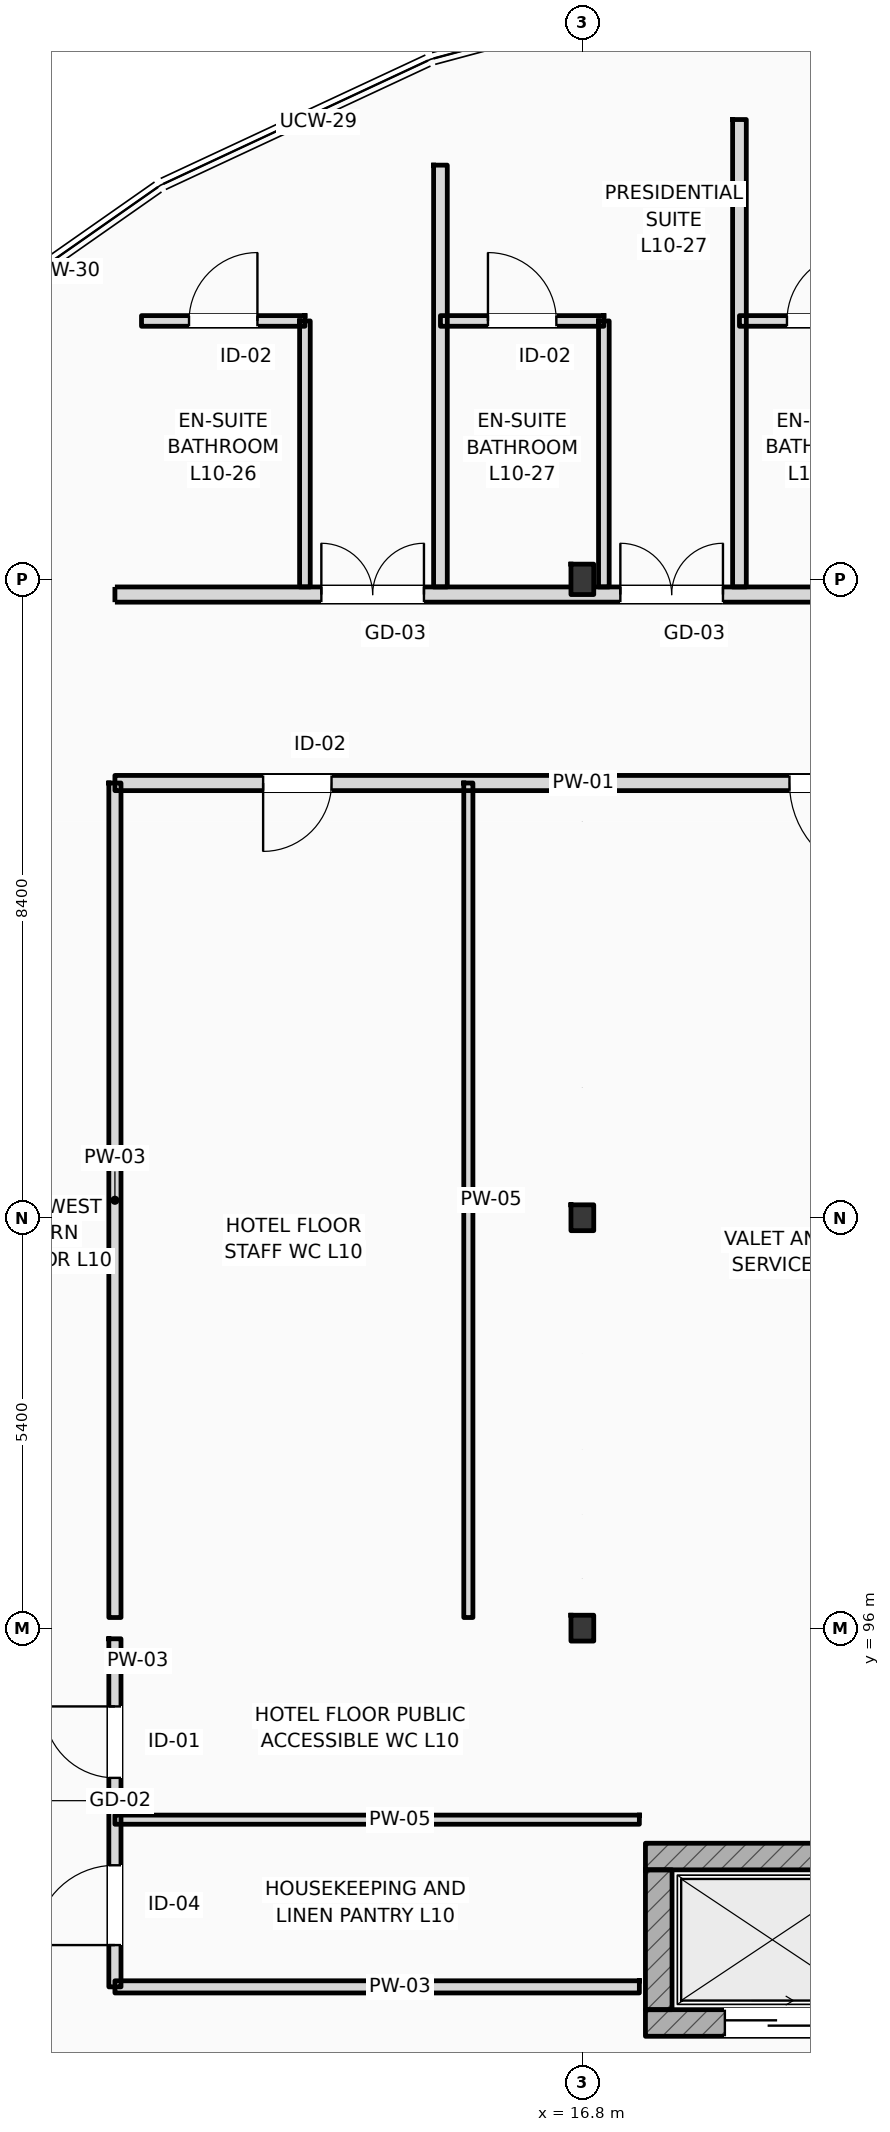
"""IFC4 building model, lengths in metres.
Left out: names, types, materials, properties, quantities, classifications, styles, units other than length and angle.
Written with IfcOpenShell. Run it as: python <this file> out.ifc"""

import sys

from ifc_helpers import new_model, si_unit, direction, frame, frame_2d, origin, origin_2d, place, context, subcontext, project, spatial, rectangle, i_section, extrude, element, fill, save


model = new_model("IFC4")
c1 = context("Model", 3, precision=1e-05, world=origin(), true_north=direction((0.0, 1.0)))
c2 = subcontext(c1, "Body", "Model", "MODEL_VIEW")
j1 = project(units=[si_unit("LENGTHUNIT", "METRE"), si_unit("PLANEANGLEUNIT", "RADIAN")], contexts=[c1])
p1 = place(None, origin())
s1 = spatial("IfcSite", under=j1, at=p1, CompositionType="ELEMENT")
p2 = place(p1, origin())
s2 = spatial("IfcBuilding", under=s1, at=p2, CompositionType="ELEMENT")
p3 = place(p2, frame((0.0, 0.0, 42.6)))
s3 = spatial("IfcBuildingStorey", under=s2, at=p3, CompositionType="ELEMENT", Elevation=42.6)
for number, where, z_axis, x_axis in (
    (1, (16.8, 96.0, 0.0), (0.0, 0.0, 1.0), (1.0, 0.0, 0.0)),
    (2, (16.8, 101.4, 0.0), (0.0, 0.0, 1.0), (1.0, 0.0, 0.0)),
):
    element("IfcColumn", number, at=place(p3, frame(where, z_axis=z_axis, x_axis=x_axis)), inside=s3, PredefinedType="COLUMN", context=c2, shape_type="SweptSolid", body=[
        extrude(i_section(OverallWidth=0.3, OverallDepth=0.34, WebThickness=0.012, FlangeThickness=0.021, FilletRadius=0.027, at=origin_2d()), origin(), (0.0, 0.0, 1.0), 4.2),
    ])
p4 = place(p3, frame((16.8, 109.8, 0.0), z_axis=(0.0, 0.0, 1.0), x_axis=(1.0, 0.0, 0.0)))
e3 = element("IfcColumn", 3, at=p4, inside=s3, PredefinedType="COLUMN", context=c2, shape_type="SweptSolid", body=[
    extrude(i_section(OverallWidth=0.3, OverallDepth=0.4, WebThickness=0.013, FlangeThickness=0.024, FilletRadius=0.027, at=origin_2d()), origin(), (0.0, 0.0, 1.0), 4.2),
])
p5 = place(p3, frame((17.63, 92.995, 0.0), z_axis=(0.0, 0.0, 1.0), x_axis=(1.0, 0.0, 0.0)))
e4 = element("IfcWall", 4, at=p5, inside=s3, PredefinedType="SHEAR", context=c2, shape_type="SweptSolid", body=[
    extrude(rectangle(XDim=3.34, YDim=0.35, at=frame_2d((1.67, 0.0))), origin(), (0.0, 0.0, 1.0), 3.94),
])
p6 = place(p3, frame((17.63, 90.805, 0.0), z_axis=(0.0, 0.0, 1.0), x_axis=(1.0, 0.0, 0.0)))
e5 = element("IfcWall", 5, at=p6, inside=s3, PredefinedType="SHEAR", context=c2, shape_type="SweptSolid", body=[
    extrude(rectangle(XDim=3.34, YDim=0.35, at=frame_2d((1.67, 0.0))), origin(), (0.0, 0.0, 1.0), 3.94),
])
p7 = place(p6, frame((1.045, 0.0, 0.0)))
e6 = element("IfcOpeningElement", 6, at=p7, cuts=e5, PredefinedType="OPENING", context=c2, shape_type="SweptSolid", body=[
    extrude(rectangle(XDim=1.25, YDim=2.25, at=frame_2d((0.625, 1.125))), frame((0.0, 0.185, 0.0), z_axis=(0.0, -1.0, 0.0), x_axis=(1.0, 0.0, 0.0)), (0.0, 0.0, 1.0), 0.37),
])
p8 = place(p3, frame((17.805, 90.98, 0.0), z_axis=(0.0, 0.0, 1.0), x_axis=(0.0, 1.0, 0.0)))
e7 = element("IfcWall", 7, at=p8, inside=s3, PredefinedType="SHEAR", context=c2, shape_type="SweptSolid", body=[
    extrude(rectangle(XDim=1.84, YDim=0.35, at=frame_2d((0.92, 0.0))), origin(), (0.0, 0.0, 1.0), 3.94),
])
p9 = place(p3, frame((10.65, 109.6, 0.0), z_axis=(0.0, 0.0, 1.0), x_axis=(1.0, 0.0, 0.0)))
e8 = element("IfcWall", 8, at=p9, inside=s3, PredefinedType="PARTITIONING", context=c2, shape_type="SweptSolid", body=[
    extrude(rectangle(XDim=84.61, YDim=0.2, at=frame_2d((42.305, 0.0))), origin(), (0.0, 0.0, 1.0), 3.38),
])
p10 = place(p9, frame((15.926, 0.0, 0.0)))
e9 = element("IfcOpeningElement", 9, at=p10, cuts=e8, PredefinedType="OPENING", context=c2, shape_type="SweptSolid", body=[
    extrude(rectangle(XDim=1.02, YDim=2.2, at=frame_2d((0.51, 1.1))), frame((0.0, 0.11, 0.0), z_axis=(0.0, -1.0, 0.0), x_axis=(1.0, 0.0, 0.0)), (0.0, 0.0, 1.0), 0.22),
])
p11 = place(p9, frame((18.45, 0.0, 0.0)))
e10 = element("IfcOpeningElement", 10, at=p11, cuts=e8, PredefinedType="OPENING", context=c2, shape_type="SweptSolid", body=[
    extrude(rectangle(XDim=1.02, YDim=2.2, at=frame_2d((0.51, 1.1))), frame((0.0, 0.11, 0.0), z_axis=(0.0, -1.0, 0.0), x_axis=(1.0, 0.0, 0.0)), (0.0, 0.0, 1.0), 0.22),
])
p12 = place(p9, frame((25.742, 0.0, 0.0)))
e11 = element("IfcOpeningElement", 11, at=p12, cuts=e8, PredefinedType="OPENING", context=c2, shape_type="SweptSolid", body=[
    extrude(rectangle(XDim=1.02, YDim=2.2, at=frame_2d((0.51, 1.1))), frame((0.0, 0.11, 0.0), z_axis=(0.0, -1.0, 0.0), x_axis=(1.0, 0.0, 0.0)), (0.0, 0.0, 1.0), 0.22),
])
p13 = place(p9, frame((31.385, 0.0, 0.0)))
e12 = element("IfcOpeningElement", 12, at=p13, cuts=e8, PredefinedType="OPENING", context=c2, shape_type="SweptSolid", body=[
    extrude(rectangle(XDim=1.02, YDim=2.2, at=frame_2d((0.51, 1.1))), frame((0.0, 0.11, 0.0), z_axis=(0.0, -1.0, 0.0), x_axis=(1.0, 0.0, 0.0)), (0.0, 0.0, 1.0), 0.22),
])
p14 = place(p9, frame((33.908, 0.0, 0.0)))
e13 = element("IfcOpeningElement", 13, at=p14, cuts=e8, PredefinedType="OPENING", context=c2, shape_type="SweptSolid", body=[
    extrude(rectangle(XDim=0.96, YDim=2.2, at=frame_2d((0.48, 1.1))), frame((0.0, 0.11, 0.0), z_axis=(0.0, -1.0, 0.0), x_axis=(1.0, 0.0, 0.0)), (0.0, 0.0, 1.0), 0.22),
])
p15 = place(p9, frame((41.201, 0.0, 0.0)))
e14 = element("IfcOpeningElement", 14, at=p15, cuts=e8, PredefinedType="OPENING", context=c2, shape_type="SweptSolid", body=[
    extrude(rectangle(XDim=0.96, YDim=2.2, at=frame_2d((0.48, 1.1))), frame((0.0, 0.11, 0.0), z_axis=(0.0, -1.0, 0.0), x_axis=(1.0, 0.0, 0.0)), (0.0, 0.0, 1.0), 0.22),
])
p16 = place(p9, frame((46.844, 0.0, 0.0)))
e15 = element("IfcOpeningElement", 15, at=p16, cuts=e8, PredefinedType="OPENING", context=c2, shape_type="SweptSolid", body=[
    extrude(rectangle(XDim=0.96, YDim=2.2, at=frame_2d((0.48, 1.1))), frame((0.0, 0.11, 0.0), z_axis=(0.0, -1.0, 0.0), x_axis=(1.0, 0.0, 0.0)), (0.0, 0.0, 1.0), 0.22),
])
p17 = place(p9, frame((49.337, 0.0, 0.0)))
e16 = element("IfcOpeningElement", 16, at=p17, cuts=e8, PredefinedType="OPENING", context=c2, shape_type="SweptSolid", body=[
    extrude(rectangle(XDim=0.96, YDim=2.2, at=frame_2d((0.48, 1.1))), frame((0.0, 0.11, 0.0), z_axis=(0.0, -1.0, 0.0), x_axis=(1.0, 0.0, 0.0)), (0.0, 0.0, 1.0), 0.22),
])
p18 = place(p9, frame((56.63, 0.0, 0.0)))
e17 = element("IfcOpeningElement", 17, at=p18, cuts=e8, PredefinedType="OPENING", context=c2, shape_type="SweptSolid", body=[
    extrude(rectangle(XDim=0.96, YDim=2.2, at=frame_2d((0.48, 1.1))), frame((0.0, 0.11, 0.0), z_axis=(0.0, -1.0, 0.0), x_axis=(1.0, 0.0, 0.0)), (0.0, 0.0, 1.0), 0.22),
])
p19 = place(p9, frame((62.523, 0.0, 0.0)))
e18 = element("IfcOpeningElement", 18, at=p19, cuts=e8, PredefinedType="OPENING", context=c2, shape_type="SweptSolid", body=[
    extrude(rectangle(XDim=0.96, YDim=2.2, at=frame_2d((0.48, 1.1))), frame((0.0, 0.11, 0.0), z_axis=(0.0, -1.0, 0.0), x_axis=(1.0, 0.0, 0.0)), (0.0, 0.0, 1.0), 0.22),
])
p20 = place(p9, frame((64.765, 0.0, 0.0)))
e19 = element("IfcOpeningElement", 19, at=p20, cuts=e8, PredefinedType="OPENING", context=c2, shape_type="SweptSolid", body=[
    extrude(rectangle(XDim=0.96, YDim=2.2, at=frame_2d((0.48, 1.1))), frame((0.0, 0.11, 0.0), z_axis=(0.0, -1.0, 0.0), x_axis=(1.0, 0.0, 0.0)), (0.0, 0.0, 1.0), 0.22),
])
p21 = place(p9, frame((72.057, 0.0, 0.0)))
e20 = element("IfcOpeningElement", 20, at=p21, cuts=e8, PredefinedType="OPENING", context=c2, shape_type="SweptSolid", body=[
    extrude(rectangle(XDim=0.96, YDim=2.2, at=frame_2d((0.48, 1.1))), frame((0.0, 0.11, 0.0), z_axis=(0.0, -1.0, 0.0), x_axis=(1.0, 0.0, 0.0)), (0.0, 0.0, 1.0), 0.22),
])
p22 = place(p9, frame((74.55, 0.0, 0.0)))
e21 = element("IfcOpeningElement", 21, at=p22, cuts=e8, PredefinedType="OPENING", context=c2, shape_type="SweptSolid", body=[
    extrude(rectangle(XDim=0.96, YDim=2.2, at=frame_2d((0.48, 1.1))), frame((0.0, 0.11, 0.0), z_axis=(0.0, -1.0, 0.0), x_axis=(1.0, 0.0, 0.0)), (0.0, 0.0, 1.0), 0.22),
])
p23 = place(p9, frame((80.163, 0.0, 0.0)))
e22 = element("IfcOpeningElement", 22, at=p23, cuts=e8, PredefinedType="OPENING", context=c2, shape_type="SweptSolid", body=[
    extrude(rectangle(XDim=0.96, YDim=2.2, at=frame_2d((0.48, 1.1))), frame((0.0, 0.11, 0.0), z_axis=(0.0, -1.0, 0.0), x_axis=(1.0, 0.0, 0.0)), (0.0, 0.0, 1.0), 0.22),
])
p24 = place(p9, frame((2.716, 0.0, 0.0)))
e23 = element("IfcOpeningElement", 23, at=p24, cuts=e8, PredefinedType="OPENING", context=c2, shape_type="SweptSolid", body=[
    extrude(rectangle(XDim=1.35, YDim=2.25, at=frame_2d((0.675, 1.125))), frame((0.0, 0.11, 0.0), z_axis=(0.0, -1.0, 0.0), x_axis=(1.0, 0.0, 0.0)), (0.0, 0.0, 1.0), 0.22),
])
p25 = place(p9, frame((6.65, 0.0, 0.0)))
e24 = element("IfcOpeningElement", 24, at=p25, cuts=e8, PredefinedType="OPENING", context=c2, shape_type="SweptSolid", body=[
    extrude(rectangle(XDim=1.35, YDim=2.25, at=frame_2d((0.675, 1.125))), frame((0.0, 0.11, 0.0), z_axis=(0.0, -1.0, 0.0), x_axis=(1.0, 0.0, 0.0)), (0.0, 0.0, 1.0), 0.22),
])
p26 = place(p9, frame((10.583, 0.0, 0.0)))
e25 = element("IfcOpeningElement", 25, at=p26, cuts=e8, PredefinedType="OPENING", context=c2, shape_type="SweptSolid", body=[
    extrude(rectangle(XDim=1.35, YDim=2.25, at=frame_2d((0.675, 1.125))), frame((0.0, 0.11, 0.0), z_axis=(0.0, -1.0, 0.0), x_axis=(1.0, 0.0, 0.0)), (0.0, 0.0, 1.0), 0.22),
])
p27 = place(p3, frame((10.65, 107.12, 0.0), z_axis=(0.0, 0.0, 1.0), x_axis=(1.0, 0.0, 0.0)))
e26 = element("IfcWall", 26, at=p27, inside=s3, PredefinedType="PARTITIONING", context=c2, shape_type="SweptSolid", body=[
    extrude(rectangle(XDim=14.8, YDim=0.2, at=frame_2d((7.4, 0.0))), origin(), (0.0, 0.0, 1.0), 3.94),
])
p28 = place(p27, frame((1.95, 0.0, 0.0)))
e27 = element("IfcOpeningElement", 27, at=p28, cuts=e26, PredefinedType="OPENING", context=c2, shape_type="SweptSolid", body=[
    extrude(rectangle(XDim=0.9, YDim=2.1, at=frame_2d((0.45, 1.05))), frame((0.0, 0.11, 0.0), z_axis=(0.0, -1.0, 0.0), x_axis=(1.0, 0.0, 0.0)), (0.0, 0.0, 1.0), 0.22),
])
p29 = place(p27, frame((8.875, 0.0, 0.0)))
e28 = element("IfcOpeningElement", 28, at=p29, cuts=e26, PredefinedType="OPENING", context=c2, shape_type="SweptSolid", body=[
    extrude(rectangle(XDim=1.25, YDim=2.15, at=frame_2d((0.625, 1.075))), frame((0.0, 0.11, 0.0), z_axis=(0.0, -1.0, 0.0), x_axis=(1.0, 0.0, 0.0)), (0.0, 0.0, 1.0), 0.22),
])
p30 = place(p3, frame((10.65, 91.28, 0.0), z_axis=(0.0, 0.0, 1.0), x_axis=(0.0, 1.0, 0.0)))
e29 = element("IfcWall", 29, at=p30, inside=s3, PredefinedType="PARTITIONING", context=c2, shape_type="SweptSolid", body=[
    extrude(rectangle(XDim=4.58, YDim=0.16, at=frame_2d((2.29, 0.0))), origin(), (0.0, 0.0, 1.0), 3.94),
])
p31 = place(p30, frame((0.55, 0.0, 0.0)))
e30 = element("IfcOpeningElement", 30, at=p31, cuts=e29, PredefinedType="OPENING", context=c2, shape_type="SweptSolid", body=[
    extrude(rectangle(XDim=1.05, YDim=2.12, at=frame_2d((0.525, 1.06))), frame((0.0, 0.09, 0.0), z_axis=(0.0, -1.0, 0.0), x_axis=(1.0, 0.0, 0.0)), (0.0, 0.0, 1.0), 0.18),
])
p32 = place(p30, frame((2.75, 0.0, 0.0)))
e31 = element("IfcOpeningElement", 31, at=p32, cuts=e29, PredefinedType="OPENING", context=c2, shape_type="SweptSolid", body=[
    extrude(rectangle(XDim=0.94, YDim=2.15, at=frame_2d((0.47, 1.075))), frame((0.0, 0.09, 0.0), z_axis=(0.0, -1.0, 0.0), x_axis=(1.0, 0.0, 0.0)), (0.0, 0.0, 1.0), 0.18),
])
p33 = place(p3, frame((14.933, 109.7, 0.0), z_axis=(0.0, 0.0, 1.0), x_axis=(0.0, 1.0, 0.0)))
e32 = element("IfcWall", 32, at=p33, inside=s3, PredefinedType="PARTITIONING", context=c2, shape_type="SweptSolid", body=[
    extrude(rectangle(XDim=5.55, YDim=0.18, at=frame_2d((2.775, 0.0))), origin(), (0.0, 0.0, 1.0), 3.94),
])
p34 = place(p3, frame((13.15, 109.7, 0.0), z_axis=(0.0, 0.0, 1.0), x_axis=(0.0, 1.0, 0.0)))
e33 = element("IfcWall", 33, at=p34, inside=s3, PredefinedType="PARTITIONING", context=c2, shape_type="SweptSolid", body=[
    extrude(rectangle(XDim=3.5, YDim=0.14, at=frame_2d((1.75, 0.0))), origin(), (0.0, 0.0, 1.0), 3.94),
])
p35 = place(p3, frame((11.0, 113.2, 0.0), z_axis=(0.0, 0.0, 1.0), x_axis=(1.0, 0.0, 0.0)))
e34 = element("IfcWall", 34, at=p35, inside=s3, PredefinedType="PARTITIONING", context=c2, shape_type="SweptSolid", body=[
    extrude(rectangle(XDim=2.15, YDim=0.14, at=frame_2d((1.075, 0.0))), origin(), (0.0, 0.0, 1.0), 3.94),
])
p36 = place(p35, frame((0.625, 0.0, 0.0)))
e35 = element("IfcOpeningElement", 35, at=p36, cuts=e34, PredefinedType="OPENING", context=c2, shape_type="SweptSolid", body=[
    extrude(rectangle(XDim=0.9, YDim=2.1, at=frame_2d((0.45, 1.05))), frame((0.0, 0.08, 0.0), z_axis=(0.0, -1.0, 0.0), x_axis=(1.0, 0.0, 0.0)), (0.0, 0.0, 1.0), 0.16),
])
p37 = place(p3, frame((18.867, 109.7, 0.0), z_axis=(0.0, 0.0, 1.0), x_axis=(0.0, 1.0, 0.0)))
e36 = element("IfcWall", 36, at=p37, inside=s3, PredefinedType="PARTITIONING", context=c2, shape_type="SweptSolid", body=[
    extrude(rectangle(XDim=6.15, YDim=0.18, at=frame_2d((3.075, 0.0))), origin(), (0.0, 0.0, 1.0), 3.94),
])
p38 = place(p3, frame((17.083, 109.7, 0.0), z_axis=(0.0, 0.0, 1.0), x_axis=(0.0, 1.0, 0.0)))
e37 = element("IfcWall", 37, at=p38, inside=s3, PredefinedType="PARTITIONING", context=c2, shape_type="SweptSolid", body=[
    extrude(rectangle(XDim=3.5, YDim=0.14, at=frame_2d((1.75, 0.0))), origin(), (0.0, 0.0, 1.0), 3.94),
])
p39 = place(p3, frame((14.933, 113.2, 0.0), z_axis=(0.0, 0.0, 1.0), x_axis=(1.0, 0.0, 0.0)))
e38 = element("IfcWall", 38, at=p39, inside=s3, PredefinedType="PARTITIONING", context=c2, shape_type="SweptSolid", body=[
    extrude(rectangle(XDim=2.15, YDim=0.14, at=frame_2d((1.075, 0.0))), origin(), (0.0, 0.0, 1.0), 3.94),
])
p40 = place(p39, frame((0.625, 0.0, 0.0)))
e39 = element("IfcOpeningElement", 39, at=p40, cuts=e38, PredefinedType="OPENING", context=c2, shape_type="SweptSolid", body=[
    extrude(rectangle(XDim=0.9, YDim=2.1, at=frame_2d((0.45, 1.05))), frame((0.0, 0.08, 0.0), z_axis=(0.0, -1.0, 0.0), x_axis=(1.0, 0.0, 0.0)), (0.0, 0.0, 1.0), 0.16),
])
p41 = place(p3, frame((18.867, 113.2, 0.0), z_axis=(0.0, 0.0, 1.0), x_axis=(1.0, 0.0, 0.0)))
e40 = element("IfcWall", 40, at=p41, inside=s3, PredefinedType="PARTITIONING", context=c2, shape_type="SweptSolid", body=[
    extrude(rectangle(XDim=2.15, YDim=0.14, at=frame_2d((1.075, 0.0))), origin(), (0.0, 0.0, 1.0), 3.94),
])
p42 = place(p41, frame((0.625, 0.0, 0.0)))
e41 = element("IfcOpeningElement", 41, at=p42, cuts=e40, PredefinedType="OPENING", context=c2, shape_type="SweptSolid", body=[
    extrude(rectangle(XDim=0.9, YDim=2.1, at=frame_2d((0.45, 1.05))), frame((0.0, 0.08, 0.0), z_axis=(0.0, -1.0, 0.0), x_axis=(1.0, 0.0, 0.0)), (0.0, 0.0, 1.0), 0.16),
])
p43 = place(p3, frame((10.65, 91.28, 0.0), z_axis=(0.0, 0.0, 1.0), x_axis=(1.0, 0.0, 0.0)))
e42 = element("IfcWall", 42, at=p43, inside=s3, PredefinedType="PARTITIONING", context=c2, shape_type="SweptSolid", body=[
    extrude(rectangle(XDim=6.9, YDim=0.16, at=frame_2d((3.45, 0.0))), origin(), (0.0, 0.0, 1.0), 3.94),
])
p44 = place(p3, frame((10.65, 96.14, 0.0), z_axis=(0.0, 0.0, 1.0), x_axis=(0.0, 1.0, 0.0)))
e43 = element("IfcWall", 43, at=p44, inside=s3, PredefinedType="PARTITIONING", context=c2, shape_type="SweptSolid", body=[
    extrude(rectangle(XDim=10.98, YDim=0.16, at=frame_2d((5.49, 0.0))), origin(), (0.0, 0.0, 1.0), 3.94),
])
p45 = place(p3, frame((10.65, 93.48, 0.0), z_axis=(0.0, 0.0, 1.0), x_axis=(1.0, 0.0, 0.0)))
e44 = element("IfcWall", 44, at=p45, inside=s3, PredefinedType="PARTITIONING", context=c2, shape_type="SweptSolid", body=[
    extrude(rectangle(XDim=6.9, YDim=0.12, at=frame_2d((3.45, 0.0))), origin(), (0.0, 0.0, 1.0), 3.94),
])
p46 = place(p3, frame((15.3, 96.14, 0.0), z_axis=(0.0, 0.0, 1.0), x_axis=(0.0, 1.0, 0.0)))
e45 = element("IfcWall", 45, at=p46, inside=s3, PredefinedType="PARTITIONING", context=c2, shape_type="SweptSolid", body=[
    extrude(rectangle(XDim=10.98, YDim=0.12, at=frame_2d((5.49, 0.0))), origin(), (0.0, 0.0, 1.0), 3.94),
])
p47 = place(p7, origin())
e46 = element("IfcDoor", 46, at=p47, inside=s3, OperationType="SLIDING_TO_LEFT", PredefinedType="DOOR", context=c2, shape_type="SweptSolid", body=[
    extrude(rectangle(XDim=1.25, YDim=2.25, at=frame_2d((0.625, 1.125))), frame((0.0, 0.025, 0.0), z_axis=(0.0, -1.0, 0.0), x_axis=(1.0, 0.0, 0.0)), (0.0, 0.0, 1.0), 0.05),
])
fill(e6, e46)
p48 = place(p24, origin())
e47 = element("IfcDoor", 47, at=p48, inside=s3, OperationType="DOUBLE_SWING_LEFT", PredefinedType="DOOR", context=c2, shape_type="SweptSolid", body=[
    extrude(rectangle(XDim=1.35, YDim=2.25, at=frame_2d((0.675, 1.125))), frame((0.0, 0.025, 0.0), z_axis=(0.0, -1.0, 0.0), x_axis=(1.0, 0.0, 0.0)), (0.0, 0.0, 1.0), 0.05),
])
fill(e23, e47)
p49 = place(p36, origin())
e48 = element("IfcDoor", 48, at=p49, inside=s3, OperationType="SINGLE_SWING_RIGHT", PredefinedType="DOOR", context=c2, shape_type="SweptSolid", body=[
    extrude(rectangle(XDim=0.9, YDim=2.1, at=frame_2d((0.45, 1.05))), frame((0.0, 0.025, 0.0), z_axis=(0.0, -1.0, 0.0), x_axis=(1.0, 0.0, 0.0)), (0.0, 0.0, 1.0), 0.05),
])
fill(e35, e48)
p50 = place(p25, origin())
e49 = element("IfcDoor", 49, at=p50, inside=s3, OperationType="DOUBLE_SWING_LEFT", PredefinedType="DOOR", context=c2, shape_type="SweptSolid", body=[
    extrude(rectangle(XDim=1.35, YDim=2.25, at=frame_2d((0.675, 1.125))), frame((0.0, 0.025, 0.0), z_axis=(0.0, -1.0, 0.0), x_axis=(1.0, 0.0, 0.0)), (0.0, 0.0, 1.0), 0.05),
])
fill(e24, e49)
p51 = place(p40, origin())
e50 = element("IfcDoor", 50, at=p51, inside=s3, OperationType="SINGLE_SWING_LEFT", PredefinedType="DOOR", context=c2, shape_type="SweptSolid", body=[
    extrude(rectangle(XDim=0.9, YDim=2.1, at=frame_2d((0.45, 1.05))), frame((0.0, 0.025, 0.0), z_axis=(0.0, -1.0, 0.0), x_axis=(1.0, 0.0, 0.0)), (0.0, 0.0, 1.0), 0.05),
])
fill(e39, e50)
p52 = place(p42, origin())
e51 = element("IfcDoor", 51, at=p52, inside=s3, OperationType="SINGLE_SWING_RIGHT", PredefinedType="DOOR", context=c2, shape_type="SweptSolid", body=[
    extrude(rectangle(XDim=0.9, YDim=2.1, at=frame_2d((0.45, 1.05))), frame((0.0, 0.025, 0.0), z_axis=(0.0, -1.0, 0.0), x_axis=(1.0, 0.0, 0.0)), (0.0, 0.0, 1.0), 0.05),
])
fill(e41, e51)
p53 = place(p31, origin())
e52 = element("IfcDoor", 52, at=p53, inside=s3, OperationType="SINGLE_SWING_LEFT", PredefinedType="DOOR", context=c2, shape_type="SweptSolid", body=[
    extrude(rectangle(XDim=1.05, YDim=2.12, at=frame_2d((0.525, 1.06))), frame((0.0, 0.025, 0.0), z_axis=(0.0, -1.0, 0.0), x_axis=(1.0, 0.0, 0.0)), (0.0, 0.0, 1.0), 0.05),
])
fill(e30, e52)
p54 = place(p32, origin())
e53 = element("IfcDoor", 53, at=p54, inside=s3, OperationType="SINGLE_SWING_RIGHT", PredefinedType="DOOR", context=c2, shape_type="SweptSolid", body=[
    extrude(rectangle(XDim=0.94, YDim=2.15, at=frame_2d((0.47, 1.075))), frame((0.0, 0.025, 0.0), z_axis=(0.0, -1.0, 0.0), x_axis=(1.0, 0.0, 0.0)), (0.0, 0.0, 1.0), 0.05),
])
fill(e31, e53)
p55 = place(p28, frame((0.9, 0.0, 0.0), z_axis=(0.0, 0.0, 1.0), x_axis=(-1.0, 0.0, 0.0)))
e54 = element("IfcDoor", 54, at=p55, inside=s3, OperationType="SINGLE_SWING_LEFT", PredefinedType="DOOR", context=c2, shape_type="SweptSolid", body=[
    extrude(rectangle(XDim=0.9, YDim=2.1, at=frame_2d((0.45, 1.05))), frame((0.0, 0.025, 0.0), z_axis=(0.0, -1.0, 0.0), x_axis=(1.0, 0.0, 0.0)), (0.0, 0.0, 1.0), 0.05),
])
fill(e27, e54)
p56 = place(p29, frame((1.25, 0.0, 0.0), z_axis=(0.0, 0.0, 1.0), x_axis=(-1.0, 0.0, 0.0)))
e55 = element("IfcDoor", 55, at=p56, inside=s3, OperationType="SINGLE_SWING_RIGHT", PredefinedType="DOOR", context=c2, shape_type="SweptSolid", body=[
    extrude(rectangle(XDim=1.25, YDim=2.15, at=frame_2d((0.625, 1.075))), frame((0.0, 0.025, 0.0), z_axis=(0.0, -1.0, 0.0), x_axis=(1.0, 0.0, 0.0)), (0.0, 0.0, 1.0), 0.05),
])
fill(e28, e55)
save(model, sys.argv[1])
